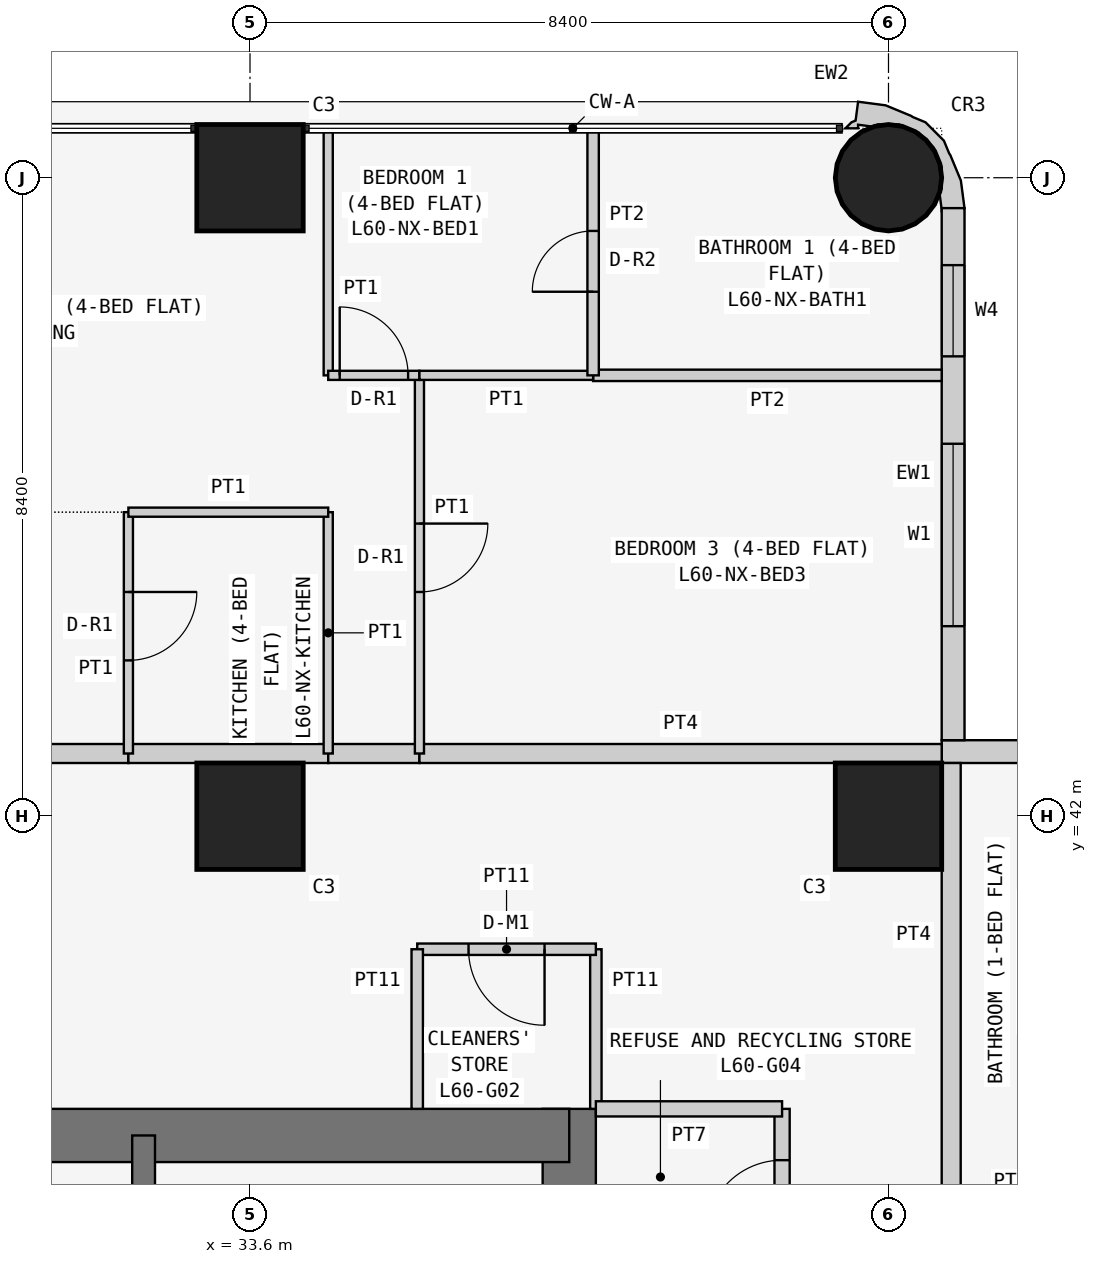
"""IFC4 building model, lengths in metres.
Left out: names, types, materials, properties, quantities, classifications, styles, units other than length and angle.
Written with IfcOpenShell. Run it as: python <this file> out.ifc"""

import sys

from ifc_helpers import new_model, si_unit, direction, frame, frame_2d, origin, origin_2d, place, context, subcontext, project, spatial, polyline, rectangle, circle, outline, extrude, element, fill, save


model = new_model("IFC4")
c1 = context("Model", 3, precision=1e-05, world=origin(), true_north=direction((0.0, 1.0)))
c2 = subcontext(c1, "Body", "Model", "MODEL_VIEW")
j1 = project(units=[si_unit("LENGTHUNIT", "METRE"), si_unit("PLANEANGLEUNIT", "RADIAN")], contexts=[c1])
p1 = place(None, origin())
s1 = spatial("IfcSite", under=j1, at=p1, CompositionType="ELEMENT")
p2 = place(p1, origin())
s2 = spatial("IfcBuilding", under=s1, at=p2, CompositionType="ELEMENT")
p3 = place(p2, frame((0.0, 0.0, 230.1)))
s3 = spatial("IfcBuildingStorey", under=s2, at=p3, CompositionType="ELEMENT", Elevation=230.1)
for number, where, z_axis, x_axis in (
    (1, (33.6, 42.0, 0.0), (0.0, 0.0, 1.0), (1.0, 0.0, 0.0)),
    (2, (33.6, 50.4, 0.0), (0.0, 0.0, 1.0), (1.0, 0.0, 0.0)),
    (3, (42.0, 42.0, 0.0), (0.0, 0.0, 1.0), (1.0, 0.0, 0.0)),
):
    element("IfcColumn", number, at=place(p3, frame(where, z_axis=z_axis, x_axis=x_axis)), inside=s3, PredefinedType="COLUMN", context=c2, shape_type="SweptSolid", body=[
        extrude(rectangle(XDim=1.4, YDim=1.4, at=origin_2d()), origin(), (0.0, 0.0, 1.0), 3.6),
    ])
p4 = place(p3, frame((42.0, 50.4, 0.0), z_axis=(0.0, 0.0, 1.0), x_axis=(1.0, 0.0, 0.0)))
e4 = element("IfcColumn", 4, at=p4, inside=s3, PredefinedType="COLUMN", context=c2, shape_type="SweptSolid", body=[
    extrude(circle(Radius=0.7, at=origin_2d()), origin(), (0.0, 0.0, 1.0), 3.6),
])
p5 = place(p3, frame((37.8, 21.0, 0.0), z_axis=(0.0, 0.0, 1.0), x_axis=(0.0, 1.0, 0.0)))
e5 = element("IfcWall", 5, at=p5, inside=s3, PredefinedType="SHEAR", context=c2, shape_type="SweptSolid", body=[
    extrude(rectangle(XDim=17.15, YDim=0.7, at=frame_2d((8.575, 0.0))), origin(), (0.0, 0.0, 1.0), 3.6),
])
p6 = place(p5, frame((5.2, 0.0, 0.0)))
e6 = element("IfcOpeningElement", 6, at=p6, cuts=e5, PredefinedType="OPENING", context=c2, shape_type="SweptSolid", body=[
    extrude(rectangle(XDim=1.2, YDim=2.1, at=frame_2d((0.6, 1.05))), frame((0.0, 0.36, 0.0), z_axis=(0.0, -1.0, 0.0), x_axis=(1.0, 0.0, 0.0)), (0.0, 0.0, 1.0), 0.72),
])
p7 = place(p3, frame((37.8, 37.8, 0.0), z_axis=(0.0, 0.0, 1.0), x_axis=(-1.0, 0.0, 0.0)))
e7 = element("IfcWall", 7, at=p7, inside=s3, PredefinedType="SHEAR", context=c2, shape_type="SweptSolid", body=[
    extrude(rectangle(XDim=17.15, YDim=0.7, at=frame_2d((8.575, 0.0))), origin(), (0.0, 0.0, 1.0), 3.6),
])
p8 = place(p3, frame((32.2, 29.25, 0.0), z_axis=(0.0, 0.0, 1.0), x_axis=(0.0, 1.0, 0.0)))
e8 = element("IfcWall", 8, at=p8, inside=s3, PredefinedType="SHEAR", context=c2, shape_type="SweptSolid", body=[
    extrude(rectangle(XDim=8.55, YDim=0.3, at=frame_2d((4.275, 0.0))), origin(), (0.0, 0.0, 1.0), 3.6),
])
p9 = place(p3, frame((50.0, 42.85, 0.0), z_axis=(0.0, 0.0, 1.0), x_axis=(-1.0, 0.0, 0.0)))
e9 = element("IfcWall", 9, at=p9, inside=s3, PredefinedType="SOLIDWALL", context=c2, shape_type="SweptSolid", body=[
    extrude(rectangle(XDim=7.3, YDim=0.3, at=frame_2d((3.65, 0.0))), origin(), (0.0, 0.0, 1.0), 3.45),
])
p10 = place(p9, frame((3.1, 0.0, 0.9)))
e10 = element("IfcOpeningElement", 10, at=p10, cuts=e9, PredefinedType="OPENING", context=c2, shape_type="SweptSolid", body=[
    extrude(rectangle(XDim=2.4, YDim=1.5, at=frame_2d((1.2, 0.75))), frame((0.0, 0.16, 0.0), z_axis=(0.0, -1.0, 0.0), x_axis=(1.0, 0.0, 0.0)), (0.0, 0.0, 1.0), 0.32),
])
p11 = place(p9, frame((0.75, 0.0, 0.9)))
e11 = element("IfcOpeningElement", 11, at=p11, cuts=e9, PredefinedType="OPENING", context=c2, shape_type="SweptSolid", body=[
    extrude(rectangle(XDim=1.2, YDim=1.5, at=frame_2d((0.6, 0.75))), frame((0.0, 0.16, 0.0), z_axis=(0.0, -1.0, 0.0), x_axis=(1.0, 0.0, 0.0)), (0.0, 0.0, 1.0), 0.32),
])
p12 = place(p3, frame((42.85, 43.0, 0.0), z_axis=(0.0, 0.0, 1.0), x_axis=(0.0, 1.0, 0.0)))
e12 = element("IfcWall", 12, at=p12, inside=s3, PredefinedType="SOLIDWALL", context=c2, shape_type="SweptSolid", body=[
    extrude(rectangle(XDim=7.0, YDim=0.3, at=frame_2d((3.5, 0.0))), origin(), (0.0, 0.0, 1.0), 3.45),
])
p13 = place(p12, frame((1.5, 0.0, 0.9)))
e13 = element("IfcOpeningElement", 13, at=p13, cuts=e12, PredefinedType="OPENING", context=c2, shape_type="SweptSolid", body=[
    extrude(rectangle(XDim=2.4, YDim=1.5, at=frame_2d((1.2, 0.75))), frame((0.0, 0.16, 0.0), z_axis=(0.0, -1.0, 0.0), x_axis=(1.0, 0.0, 0.0)), (0.0, 0.0, 1.0), 0.32),
])
p14 = place(p12, frame((5.05, 0.0, 0.9)))
e14 = element("IfcOpeningElement", 14, at=p14, cuts=e12, PredefinedType="OPENING", context=c2, shape_type="SweptSolid", body=[
    extrude(rectangle(XDim=1.2, YDim=1.5, at=frame_2d((0.6, 0.75))), frame((0.0, 0.16, 0.0), z_axis=(0.0, -1.0, 0.0), x_axis=(1.0, 0.0, 0.0)), (0.0, 0.0, 1.0), 0.32),
])
p15 = place(p3, frame((42.724, 50.11, 0.0), z_axis=(0.0, 0.0, 1.0), x_axis=(0.439933741929, 0.898030234854, 0.0)))
e15 = element("IfcWall", 15, at=p15, inside=s3, PredefinedType="SOLIDWALL", context=c2, shape_type="SweptSolid", body=[
    extrude(outline(polyline([(-0.145, -0.044), (0.022, -0.296), (0.327, -0.094), (0.568, 0.18), (0.577, 0.199), (0.7, 0.337), (0.811, 0.661), (0.799, 0.845), (0.803, 0.866), (0.78, 1.231), (0.664, 1.577), (0.426, 1.497), (0.382, 1.536), (0.276, 1.572), (0.349, 1.423), (0.392, 1.444), (0.453, 1.261), (0.51, 1.211), (0.632, 0.961), (0.65, 0.683), (0.56, 0.419), (0.375, 0.21), (0.125, 0.087), (0.05, 0.082), (-0.127, -0.035), (-0.145, -0.044)])), origin(), (0.0, 0.0, 1.0), 3.45),
])
p16 = place(p3, frame((38.15, 38.15, 0.0), z_axis=(0.0, 0.0, 1.0), x_axis=(0.0, 1.0, 0.0)))
e16 = element("IfcWall", 16, at=p16, inside=s3, PredefinedType="PARTITIONING", context=c2, shape_type="SweptSolid", body=[
    extrude(rectangle(XDim=2.1, YDim=0.15, at=frame_2d((1.05, 0.0))), origin(), (0.0, 0.0, 1.0), 3.45),
])
p17 = place(p3, frame((38.15, 40.25, 0.0), z_axis=(0.0, 0.0, 1.0), x_axis=(-1.0, 0.0, 0.0)))
e17 = element("IfcWall", 17, at=p17, inside=s3, PredefinedType="PARTITIONING", context=c2, shape_type="SweptSolid", body=[
    extrude(rectangle(XDim=2.35, YDim=0.15, at=frame_2d((1.175, 0.0))), origin(), (0.0, 0.0, 1.0), 3.45),
])
p18 = place(p17, frame((0.675, 0.0, 0.0)))
e18 = element("IfcOpeningElement", 18, at=p18, cuts=e17, PredefinedType="OPENING", context=c2, shape_type="SweptSolid", body=[
    extrude(rectangle(XDim=1.0, YDim=2.1, at=frame_2d((0.5, 1.05))), frame((0.0, 0.085, 0.0), z_axis=(0.0, -1.0, 0.0), x_axis=(1.0, 0.0, 0.0)), (0.0, 0.0, 1.0), 0.17),
])
p19 = place(p3, frame((35.8, 40.25, 0.0), z_axis=(0.0, 0.0, 1.0), x_axis=(0.0, -1.0, 0.0)))
e19 = element("IfcWall", 19, at=p19, inside=s3, PredefinedType="PARTITIONING", context=c2, shape_type="SweptSolid", body=[
    extrude(rectangle(XDim=2.1, YDim=0.15, at=frame_2d((1.05, 0.0))), origin(), (0.0, 0.0, 1.0), 3.45),
])
p20 = place(p3, frame((40.6, 35.8, 0.0), z_axis=(0.0, 0.0, 1.0), x_axis=(0.0, 1.0, 0.0)))
e20 = element("IfcWall", 20, at=p20, inside=s3, PredefinedType="PARTITIONING", context=c2, shape_type="SweptSolid", body=[
    extrude(rectangle(XDim=2.35, YDim=0.2, at=frame_2d((1.175, 0.0))), origin(), (0.0, 0.0, 1.0), 3.45),
])
p21 = place(p20, frame((0.675, 0.0, 0.0)))
e21 = element("IfcOpeningElement", 21, at=p21, cuts=e20, PredefinedType="OPENING", context=c2, shape_type="SweptSolid", body=[
    extrude(rectangle(XDim=1.0, YDim=2.1, at=frame_2d((0.5, 1.05))), frame((0.0, 0.11, 0.0), z_axis=(0.0, -1.0, 0.0), x_axis=(1.0, 0.0, 0.0)), (0.0, 0.0, 1.0), 0.22),
])
p22 = place(p3, frame((40.6, 38.15, 0.0), z_axis=(0.0, 0.0, 1.0), x_axis=(-1.0, 0.0, 0.0)))
e22 = element("IfcWall", 22, at=p22, inside=s3, PredefinedType="PARTITIONING", context=c2, shape_type="SweptSolid", body=[
    extrude(rectangle(XDim=2.45, YDim=0.2, at=frame_2d((1.225, 0.0))), origin(), (0.0, 0.0, 1.0), 3.45),
])
p23 = place(p3, frame((26.8, 42.825, 0.0), z_axis=(0.0, 0.0, 1.0), x_axis=(1.0, 0.0, 0.0)))
e23 = element("IfcWall", 23, at=p23, inside=s3, PredefinedType="PARTITIONING", context=c2, shape_type="SweptSolid", body=[
    extrude(rectangle(XDim=5.2, YDim=0.25, at=frame_2d((2.6, 0.0))), origin(), (0.0, 0.0, 1.0), 3.45),
])
p24 = place(p23, frame((2.1, 0.0, 0.0)))
e24 = element("IfcOpeningElement", 24, at=p24, cuts=e23, PredefinedType="OPENING", context=c2, shape_type="SweptSolid", body=[
    extrude(rectangle(XDim=1.0, YDim=2.1, at=frame_2d((0.5, 1.05))), frame((0.0, 0.135, 0.0), z_axis=(0.0, -1.0, 0.0), x_axis=(1.0, 0.0, 0.0)), (0.0, 0.0, 1.0), 0.27),
])
p25 = place(p3, frame((32.0, 42.825, 0.0), z_axis=(0.0, 0.0, 1.0), x_axis=(1.0, 0.0, 0.0)))
e25 = element("IfcWall", 25, at=p25, inside=s3, PredefinedType="PARTITIONING", context=c2, shape_type="SweptSolid", body=[
    extrude(rectangle(XDim=2.629, YDim=0.25, at=frame_2d((1.314, 0.0))), origin(), (0.0, 0.0, 1.0), 3.45),
])
p26 = place(p3, frame((34.629, 42.825, 0.0), z_axis=(0.0, 0.0, 1.0), x_axis=(1.0, 0.0, 0.0)))
e26 = element("IfcWall", 26, at=p26, inside=s3, PredefinedType="PARTITIONING", context=c2, shape_type="SweptSolid", body=[
    extrude(rectangle(XDim=1.2, YDim=0.25, at=frame_2d((0.6, 0.0))), origin(), (0.0, 0.0, 1.0), 3.45),
])
p27 = place(p3, frame((35.829, 42.825, 0.0), z_axis=(0.0, 0.0, 1.0), x_axis=(1.0, 0.0, 0.0)))
e27 = element("IfcWall", 27, at=p27, inside=s3, PredefinedType="PARTITIONING", context=c2, shape_type="SweptSolid", body=[
    extrude(rectangle(XDim=6.871, YDim=0.25, at=frame_2d((3.436, 0.0))), origin(), (0.0, 0.0, 1.0), 3.45),
])
p28 = place(p3, frame((42.825, 42.7, 0.0), z_axis=(0.0, 0.0, 1.0), x_axis=(0.0, -1.0, 0.0)))
e28 = element("IfcWall", 28, at=p28, inside=s3, PredefinedType="PARTITIONING", context=c2, shape_type="SweptSolid", body=[
    extrude(rectangle(XDim=6.471, YDim=0.25, at=frame_2d((3.235, 0.0))), origin(), (0.0, 0.0, 1.0), 3.45),
])
p29 = place(p3, frame((32.0, 42.825, 0.0), z_axis=(0.0, 0.0, 1.0), x_axis=(0.0, 1.0, 0.0)))
e29 = element("IfcWall", 29, at=p29, inside=s3, PredefinedType="PARTITIONING", context=c2, shape_type="SweptSolid", body=[
    extrude(rectangle(XDim=3.175, YDim=0.12, at=frame_2d((1.587, 0.0))), origin(), (0.0, 0.0, 1.0), 3.45),
])
p30 = place(p29, frame((1.225, 0.0, 0.0)))
e30 = element("IfcOpeningElement", 30, at=p30, cuts=e29, PredefinedType="OPENING", context=c2, shape_type="SweptSolid", body=[
    extrude(rectangle(XDim=0.9, YDim=2.1, at=frame_2d((0.45, 1.05))), frame((0.0, 0.07, 0.0), z_axis=(0.0, -1.0, 0.0), x_axis=(1.0, 0.0, 0.0)), (0.0, 0.0, 1.0), 0.14),
])
p31 = place(p3, frame((34.629, 42.825, 0.0), z_axis=(0.0, 0.0, 1.0), x_axis=(0.0, 1.0, 0.0)))
e31 = element("IfcWall", 31, at=p31, inside=s3, PredefinedType="PARTITIONING", context=c2, shape_type="SweptSolid", body=[
    extrude(rectangle(XDim=3.175, YDim=0.12, at=frame_2d((1.587, 0.0))), origin(), (0.0, 0.0, 1.0), 3.45),
])
p32 = place(p3, frame((34.629, 46.0, 0.0), z_axis=(0.0, 0.0, 1.0), x_axis=(-1.0, 0.0, 0.0)))
e32 = element("IfcWall", 32, at=p32, inside=s3, PredefinedType="PARTITIONING", context=c2, shape_type="SweptSolid", body=[
    extrude(rectangle(XDim=2.629, YDim=0.12, at=frame_2d((1.314, 0.0))), origin(), (0.0, 0.0, 1.0), 3.45),
])
p33 = place(p3, frame((35.829, 47.8, 0.0), z_axis=(0.0, 0.0, 1.0), x_axis=(0.0, -1.0, 0.0)))
e33 = element("IfcWall", 33, at=p33, inside=s3, PredefinedType="PARTITIONING", context=c2, shape_type="SweptSolid", body=[
    extrude(rectangle(XDim=4.975, YDim=0.12, at=frame_2d((2.488, 0.0))), origin(), (0.0, 0.0, 1.0), 3.45),
])
p34 = place(p33, frame((1.95, 0.0, 0.0)))
e34 = element("IfcOpeningElement", 34, at=p34, cuts=e33, PredefinedType="OPENING", context=c2, shape_type="SweptSolid", body=[
    extrude(rectangle(XDim=0.9, YDim=2.1, at=frame_2d((0.45, 1.05))), frame((0.0, 0.07, 0.0), z_axis=(0.0, -1.0, 0.0), x_axis=(1.0, 0.0, 0.0)), (0.0, 0.0, 1.0), 0.14),
])
p35 = place(p3, frame((34.629, 51.05, 0.0), z_axis=(0.0, 0.0, 1.0), x_axis=(0.0, -1.0, 0.0)))
e35 = element("IfcWall", 35, at=p35, inside=s3, PredefinedType="PARTITIONING", context=c2, shape_type="SweptSolid", body=[
    extrude(rectangle(XDim=3.25, YDim=0.12, at=frame_2d((1.625, 0.0))), origin(), (0.0, 0.0, 1.0), 3.45),
])
p36 = place(p3, frame((34.629, 47.8, 0.0), z_axis=(0.0, 0.0, 1.0), x_axis=(1.0, 0.0, 0.0)))
e36 = element("IfcWall", 36, at=p36, inside=s3, PredefinedType="PARTITIONING", context=c2, shape_type="SweptSolid", body=[
    extrude(rectangle(XDim=1.2, YDim=0.12, at=frame_2d((0.6, 0.0))), origin(), (0.0, 0.0, 1.0), 3.45),
])
p37 = place(p36, frame((0.151, 0.0, 0.0)))
e37 = element("IfcOpeningElement", 37, at=p37, cuts=e36, PredefinedType="OPENING", context=c2, shape_type="SweptSolid", body=[
    extrude(rectangle(XDim=0.9, YDim=2.1, at=frame_2d((0.45, 1.05))), frame((0.0, 0.07, 0.0), z_axis=(0.0, -1.0, 0.0), x_axis=(1.0, 0.0, 0.0)), (0.0, 0.0, 1.0), 0.14),
])
p38 = place(p3, frame((42.7, 47.8, 0.0), z_axis=(0.0, 0.0, 1.0), x_axis=(-1.0, 0.0, 0.0)))
e38 = element("IfcWall", 38, at=p38, inside=s3, PredefinedType="PARTITIONING", context=c2, shape_type="SweptSolid", body=[
    extrude(rectangle(XDim=4.586, YDim=0.15, at=frame_2d((2.293, 0.0))), origin(), (0.0, 0.0, 1.0), 3.45),
])
p39 = place(p3, frame((38.114, 47.8, 0.0), z_axis=(0.0, 0.0, 1.0), x_axis=(-1.0, 0.0, 0.0)))
e39 = element("IfcWall", 39, at=p39, inside=s3, PredefinedType="PARTITIONING", context=c2, shape_type="SweptSolid", body=[
    extrude(rectangle(XDim=2.285, YDim=0.12, at=frame_2d((1.143, 0.0))), origin(), (0.0, 0.0, 1.0), 3.45),
])
p40 = place(p3, frame((38.114, 51.05, 0.0), z_axis=(0.0, 0.0, 1.0), x_axis=(0.0, -1.0, 0.0)))
e40 = element("IfcWall", 40, at=p40, inside=s3, PredefinedType="PARTITIONING", context=c2, shape_type="SweptSolid", body=[
    extrude(rectangle(XDim=3.25, YDim=0.15, at=frame_2d((1.625, 0.0))), origin(), (0.0, 0.0, 1.0), 3.45),
])
p41 = place(p40, frame((1.35, 0.0, 0.0)))
e41 = element("IfcOpeningElement", 41, at=p41, cuts=e40, PredefinedType="OPENING", context=c2, shape_type="SweptSolid", body=[
    extrude(rectangle(XDim=0.8, YDim=2.1, at=frame_2d((0.4, 1.05))), frame((0.0, 0.085, 0.0), z_axis=(0.0, -1.0, 0.0), x_axis=(1.0, 0.0, 0.0)), (0.0, 0.0, 1.0), 0.17),
])
p42 = place(p13, origin())
e42 = element("IfcWindow", 42, at=p42, inside=s3, PartitioningType="SINGLE_PANEL", PredefinedType="WINDOW", context=c2, shape_type="SweptSolid", body=[
    extrude(rectangle(XDim=2.4, YDim=1.5, at=frame_2d((1.2, 0.75))), frame((0.0, 0.03, 0.0), z_axis=(0.0, -1.0, 0.0), x_axis=(1.0, 0.0, 0.0)), (0.0, 0.0, 1.0), 0.06),
])
fill(e13, e42)
p43 = place(p14, origin())
e43 = element("IfcWindow", 43, at=p43, inside=s3, PartitioningType="SINGLE_PANEL", PredefinedType="WINDOW", context=c2, shape_type="SweptSolid", body=[
    extrude(rectangle(XDim=1.2, YDim=1.5, at=frame_2d((0.6, 0.75))), frame((0.0, 0.03, 0.0), z_axis=(0.0, -1.0, 0.0), x_axis=(1.0, 0.0, 0.0)), (0.0, 0.0, 1.0), 0.06),
])
fill(e14, e43)
p44 = place(p18, origin())
e44 = element("IfcDoor", 44, at=p44, inside=s3, OperationType="SINGLE_SWING_LEFT", PredefinedType="DOOR", context=c2, shape_type="SweptSolid", body=[
    extrude(rectangle(XDim=1.0, YDim=2.1, at=frame_2d((0.5, 1.05))), frame((0.0, 0.025, 0.0), z_axis=(0.0, -1.0, 0.0), x_axis=(1.0, 0.0, 0.0)), (0.0, 0.0, 1.0), 0.05),
])
fill(e18, e44)
p45 = place(p21, origin())
e45 = element("IfcDoor", 45, at=p45, inside=s3, OperationType="SINGLE_SWING_LEFT", PredefinedType="DOOR", context=c2, shape_type="SweptSolid", body=[
    extrude(rectangle(XDim=1.0, YDim=2.1, at=frame_2d((0.5, 1.05))), frame((0.0, 0.025, 0.0), z_axis=(0.0, -1.0, 0.0), x_axis=(1.0, 0.0, 0.0)), (0.0, 0.0, 1.0), 0.05),
])
fill(e21, e45)
p46 = place(p30, frame((0.9, 0.0, 0.0), z_axis=(0.0, 0.0, 1.0), x_axis=(-1.0, 0.0, 0.0)))
e46 = element("IfcDoor", 46, at=p46, inside=s3, OperationType="SINGLE_SWING_LEFT", PredefinedType="DOOR", context=c2, shape_type="SweptSolid", body=[
    extrude(rectangle(XDim=0.9, YDim=2.1, at=frame_2d((0.45, 1.05))), frame((0.0, 0.025, 0.0), z_axis=(0.0, -1.0, 0.0), x_axis=(1.0, 0.0, 0.0)), (0.0, 0.0, 1.0), 0.05),
])
fill(e30, e46)
p47 = place(p34, origin())
e47 = element("IfcDoor", 47, at=p47, inside=s3, OperationType="SINGLE_SWING_LEFT", PredefinedType="DOOR", context=c2, shape_type="SweptSolid", body=[
    extrude(rectangle(XDim=0.9, YDim=2.1, at=frame_2d((0.45, 1.05))), frame((0.0, 0.025, 0.0), z_axis=(0.0, -1.0, 0.0), x_axis=(1.0, 0.0, 0.0)), (0.0, 0.0, 1.0), 0.05),
])
fill(e34, e47)
p48 = place(p37, origin())
e48 = element("IfcDoor", 48, at=p48, inside=s3, OperationType="SINGLE_SWING_LEFT", PredefinedType="DOOR", context=c2, shape_type="SweptSolid", body=[
    extrude(rectangle(XDim=0.9, YDim=2.1, at=frame_2d((0.45, 1.05))), frame((0.0, 0.025, 0.0), z_axis=(0.0, -1.0, 0.0), x_axis=(1.0, 0.0, 0.0)), (0.0, 0.0, 1.0), 0.05),
])
fill(e37, e48)
p49 = place(p41, frame((0.8, 0.0, 0.0), z_axis=(0.0, 0.0, 1.0), x_axis=(-1.0, 0.0, 0.0)))
e49 = element("IfcDoor", 49, at=p49, inside=s3, OperationType="SINGLE_SWING_LEFT", PredefinedType="DOOR", context=c2, shape_type="SweptSolid", body=[
    extrude(rectangle(XDim=0.8, YDim=2.1, at=frame_2d((0.4, 1.05))), frame((0.0, 0.025, 0.0), z_axis=(0.0, -1.0, 0.0), x_axis=(1.0, 0.0, 0.0)), (0.0, 0.0, 1.0), 0.05),
])
fill(e41, e49)
save(model, sys.argv[1])
